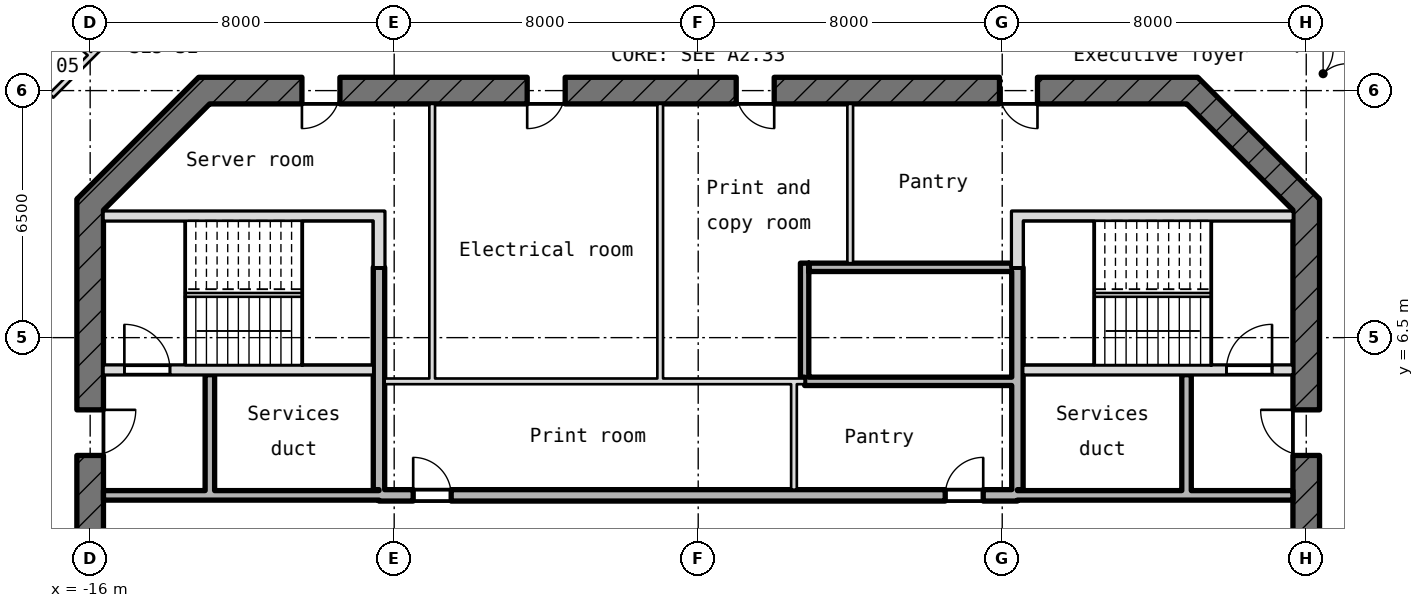
"""IFC4 building model, lengths in metres.
Left out: names, types, materials, properties, quantities, classifications, styles, units other than length and angle.
Written with IfcOpenShell. Run it as: python <this file> out.ifc"""

import sys

from ifc_helpers import new_model, si_unit, direction, frame, frame_2d, origin, place, context, subcontext, project, spatial, rectangle, extrude, element, fill, save


model = new_model("IFC4")
c1 = context("Model", 3, precision=1e-05, world=origin(), true_north=direction((0.0, 1.0)))
c2 = subcontext(c1, "Body", "Model", "MODEL_VIEW")
j1 = project(units=[si_unit("LENGTHUNIT", "METRE"), si_unit("PLANEANGLEUNIT", "RADIAN")], contexts=[c1])
p1 = place(None, origin())
s1 = spatial("IfcSite", under=j1, at=p1, CompositionType="ELEMENT")
p2 = place(p1, origin())
s2 = spatial("IfcBuilding", under=s1, at=p2, CompositionType="ELEMENT")
p3 = place(p2, frame((0.0, 0.0, 359.2)))
s3 = spatial("IfcBuildingStorey", under=s2, at=p3, CompositionType="ELEMENT", Elevation=359.2)
p4 = place(p3, frame((16.0, -10.145, -0.18), z_axis=(0.0, 0.0, 1.0), x_axis=(0.0, 1.0, 0.0)))
e1 = element("IfcWall", 1, at=p4, inside=s3, PredefinedType="SHEAR", context=c2, shape_type="SweptSolid", body=[
    extrude(rectangle(XDim=20.29, YDim=0.7, at=frame_2d((10.145, 0.0))), origin(), (0.0, 0.0, 1.0), 4.15),
])
p5 = place(p4, frame((8.945, 0.0, 0.18)))
e2 = element("IfcOpeningElement", 2, at=p5, cuts=e1, PredefinedType="OPENING", context=c2, shape_type="SweptSolid", body=[
    extrude(rectangle(XDim=2.4, YDim=2.1, at=frame_2d((1.2, 1.05))), frame((0.0, 0.36, 0.0), z_axis=(0.0, -1.0, 0.0), x_axis=(1.0, 0.0, 0.0)), (0.0, 0.0, 1.0), 0.72),
])
p6 = place(p4, frame((13.545, 0.0, 0.18)))
e3 = element("IfcOpeningElement", 3, at=p6, cuts=e1, PredefinedType="OPENING", context=c2, shape_type="SweptSolid", body=[
    extrude(rectangle(XDim=1.2, YDim=2.1, at=frame_2d((0.6, 1.05))), frame((0.0, 0.36, 0.0), z_axis=(0.0, -1.0, 0.0), x_axis=(1.0, 0.0, 0.0)), (0.0, 0.0, 1.0), 0.72),
])
p7 = place(p4, frame((2.4, 0.0, 0.18)))
e4 = element("IfcOpeningElement", 4, at=p7, cuts=e1, PredefinedType="OPENING", context=c2, shape_type="SweptSolid", body=[
    extrude(rectangle(XDim=1.2, YDim=2.1, at=frame_2d((0.6, 1.05))), frame((0.0, 0.36, 0.0), z_axis=(0.0, -1.0, 0.0), x_axis=(1.0, 0.0, 0.0)), (0.0, 0.0, 1.0), 0.72),
])
p8 = place(p3, frame((16.103, 9.897, -0.18), z_axis=(0.0, 0.0, 1.0), x_axis=(-0.707106781187, 0.707106781187, 0.0)))
e5 = element("IfcWall", 5, at=p8, inside=s3, PredefinedType="SHEAR", context=c2, shape_type="SweptSolid", body=[
    extrude(rectangle(XDim=4.533, YDim=0.7, at=frame_2d((2.266, 0.0))), origin(), (0.0, 0.0, 1.0), 4.15),
])
p9 = place(p3, frame((13.145, 13.0, -0.18), z_axis=(0.0, 0.0, 1.0), x_axis=(-1.0, 0.0, 0.0)))
e6 = element("IfcWall", 6, at=p9, inside=s3, PredefinedType="SHEAR", context=c2, shape_type="SweptSolid", body=[
    extrude(rectangle(XDim=26.29, YDim=0.7, at=frame_2d((13.145, 0.0))), origin(), (0.0, 0.0, 1.0), 4.15),
])
p10 = place(p9, frame((22.573, 0.0, 0.18)))
e7 = element("IfcOpeningElement", 7, at=p10, cuts=e6, PredefinedType="OPENING", context=c2, shape_type="SweptSolid", body=[
    extrude(rectangle(XDim=1.0, YDim=2.1, at=frame_2d((0.5, 1.05))), frame((0.0, 0.36, 0.0), z_axis=(0.0, -1.0, 0.0), x_axis=(1.0, 0.0, 0.0)), (0.0, 0.0, 1.0), 0.72),
])
p11 = place(p9, frame((16.645, 0.0, 0.18)))
e8 = element("IfcOpeningElement", 8, at=p11, cuts=e6, PredefinedType="OPENING", context=c2, shape_type="SweptSolid", body=[
    extrude(rectangle(XDim=1.0, YDim=2.1, at=frame_2d((0.5, 1.05))), frame((0.0, 0.36, 0.0), z_axis=(0.0, -1.0, 0.0), x_axis=(1.0, 0.0, 0.0)), (0.0, 0.0, 1.0), 0.72),
])
p12 = place(p9, frame((11.145, 0.0, 0.18)))
e9 = element("IfcOpeningElement", 9, at=p12, cuts=e6, PredefinedType="OPENING", context=c2, shape_type="SweptSolid", body=[
    extrude(rectangle(XDim=1.0, YDim=2.1, at=frame_2d((0.5, 1.05))), frame((0.0, 0.36, 0.0), z_axis=(0.0, -1.0, 0.0), x_axis=(1.0, 0.0, 0.0)), (0.0, 0.0, 1.0), 0.72),
])
p13 = place(p9, frame((4.217, 0.0, 0.18)))
e10 = element("IfcOpeningElement", 10, at=p13, cuts=e6, PredefinedType="OPENING", context=c2, shape_type="SweptSolid", body=[
    extrude(rectangle(XDim=1.0, YDim=2.1, at=frame_2d((0.5, 1.05))), frame((0.0, 0.36, 0.0), z_axis=(0.0, -1.0, 0.0), x_axis=(1.0, 0.0, 0.0)), (0.0, 0.0, 1.0), 0.72),
])
p14 = place(p3, frame((-12.897, 13.103, -0.18), z_axis=(0.0, 0.0, 1.0), x_axis=(-0.707106781187, -0.707106781187, 0.0)))
e11 = element("IfcWall", 11, at=p14, inside=s3, PredefinedType="SHEAR", context=c2, shape_type="SweptSolid", body=[
    extrude(rectangle(XDim=4.533, YDim=0.7, at=frame_2d((2.266, 0.0))), origin(), (0.0, 0.0, 1.0), 4.15),
])
p15 = place(p3, frame((-16.0, 10.145, -0.18), z_axis=(0.0, 0.0, 1.0), x_axis=(0.0, -1.0, 0.0)))
e12 = element("IfcWall", 12, at=p15, inside=s3, PredefinedType="SHEAR", context=c2, shape_type="SweptSolid", body=[
    extrude(rectangle(XDim=20.29, YDim=0.7, at=frame_2d((10.145, 0.0))), origin(), (0.0, 0.0, 1.0), 4.15),
])
p16 = place(p15, frame((8.945, 0.0, 0.18)))
e13 = element("IfcOpeningElement", 13, at=p16, cuts=e12, PredefinedType="OPENING", context=c2, shape_type="SweptSolid", body=[
    extrude(rectangle(XDim=2.4, YDim=2.1, at=frame_2d((1.2, 1.05))), frame((0.0, 0.36, 0.0), z_axis=(0.0, -1.0, 0.0), x_axis=(1.0, 0.0, 0.0)), (0.0, 0.0, 1.0), 0.72),
])
p17 = place(p15, frame((5.545, 0.0, 0.18)))
e14 = element("IfcOpeningElement", 14, at=p17, cuts=e12, PredefinedType="OPENING", context=c2, shape_type="SweptSolid", body=[
    extrude(rectangle(XDim=1.2, YDim=2.1, at=frame_2d((0.6, 1.05))), frame((0.0, 0.36, 0.0), z_axis=(0.0, -1.0, 0.0), x_axis=(1.0, 0.0, 0.0)), (0.0, 0.0, 1.0), 0.72),
])
p18 = place(p3, frame((-15.65, 2.35, 0.0), z_axis=(0.0, 0.0, 1.0), x_axis=(1.0, 0.0, 0.0)))
e15 = element("IfcWall", 15, at=p18, inside=s3, PredefinedType="STANDARD", context=c2, shape_type="SweptSolid", body=[
    extrude(rectangle(XDim=7.25, YDim=0.25, at=frame_2d((3.625, 0.0))), origin(), (0.0, 0.0, 1.0), 3.97),
])
p19 = place(p3, frame((-8.4, 2.35, -0.18), z_axis=(0.0, 0.0, 1.0), x_axis=(1.0, 0.0, 0.0)))
e16 = element("IfcWall", 16, at=p19, inside=s3, PredefinedType="SHEAR", context=c2, shape_type="SweptSolid", body=[
    extrude(rectangle(XDim=16.8, YDim=0.3, at=frame_2d((8.4, 0.0))), origin(), (0.0, 0.0, 1.0), 4.15),
])
p20 = place(p19, frame((0.9, 0.0, 0.18)))
e17 = element("IfcOpeningElement", 17, at=p20, cuts=e16, PredefinedType="OPENING", context=c2, shape_type="SweptSolid", body=[
    extrude(rectangle(XDim=1.0, YDim=2.1, at=frame_2d((0.5, 1.05))), frame((0.0, 0.16, 0.0), z_axis=(0.0, -1.0, 0.0), x_axis=(1.0, 0.0, 0.0)), (0.0, 0.0, 1.0), 0.32),
])
p21 = place(p19, frame((14.9, 0.0, 0.18)))
e18 = element("IfcOpeningElement", 18, at=p21, cuts=e16, PredefinedType="OPENING", context=c2, shape_type="SweptSolid", body=[
    extrude(rectangle(XDim=1.0, YDim=2.1, at=frame_2d((0.5, 1.05))), frame((0.0, 0.16, 0.0), z_axis=(0.0, -1.0, 0.0), x_axis=(1.0, 0.0, 0.0)), (0.0, 0.0, 1.0), 0.32),
])
p22 = place(p3, frame((8.4, 2.35, 0.0), z_axis=(0.0, 0.0, 1.0), x_axis=(1.0, 0.0, 0.0)))
e19 = element("IfcWall", 19, at=p22, inside=s3, PredefinedType="STANDARD", context=c2, shape_type="SweptSolid", body=[
    extrude(rectangle(XDim=7.25, YDim=0.25, at=frame_2d((3.625, 0.0))), origin(), (0.0, 0.0, 1.0), 3.97),
])
p23 = place(p3, frame((-8.25, 5.35, 0.0), z_axis=(0.0, 0.0, 1.0), x_axis=(1.0, 0.0, 0.0)))
e20 = element("IfcWall", 20, at=p23, inside=s3, PredefinedType="PARTITIONING", context=c2, shape_type="SweptSolid", body=[
    extrude(rectangle(XDim=11.05, YDim=0.15, at=frame_2d((5.525, 0.0))), origin(), (0.0, 0.0, 1.0), 3.97),
])
p24 = place(p3, frame((2.8, 5.35, 0.0), z_axis=(0.0, 0.0, 1.0), x_axis=(1.0, 0.0, 0.0)))
e21 = element("IfcWall", 21, at=p24, inside=s3, PredefinedType="STANDARD", context=c2, shape_type="SweptSolid", body=[
    extrude(rectangle(XDim=5.45, YDim=0.22, at=frame_2d((2.725, 0.0))), origin(), (0.0, 0.0, 1.0), 3.97),
])
p25 = place(p3, frame((-15.65, 5.65, -0.18), z_axis=(0.0, 0.0, 1.0), x_axis=(1.0, 0.0, 0.0)))
e22 = element("IfcWall", 22, at=p25, inside=s3, PredefinedType="SHEAR", context=c2, shape_type="SweptSolid", body=[
    extrude(rectangle(XDim=7.1, YDim=0.25, at=frame_2d((3.55, 0.0))), origin(), (0.0, 0.0, 1.0), 4.15),
])
p26 = place(p25, frame((0.55, 0.0, 0.18)))
e23 = element("IfcOpeningElement", 23, at=p26, cuts=e22, PredefinedType="OPENING", context=c2, shape_type="SweptSolid", body=[
    extrude(rectangle(XDim=1.2, YDim=2.1, at=frame_2d((0.6, 1.05))), frame((0.0, 0.135, 0.0), z_axis=(0.0, -1.0, 0.0), x_axis=(1.0, 0.0, 0.0)), (0.0, 0.0, 1.0), 0.27),
])
p27 = place(p3, frame((8.55, 5.65, -0.18), z_axis=(0.0, 0.0, 1.0), x_axis=(1.0, 0.0, 0.0)))
e24 = element("IfcWall", 24, at=p27, inside=s3, PredefinedType="SHEAR", context=c2, shape_type="SweptSolid", body=[
    extrude(rectangle(XDim=7.1, YDim=0.25, at=frame_2d((3.55, 0.0))), origin(), (0.0, 0.0, 1.0), 4.15),
])
p28 = place(p27, frame((5.35, 0.0, 0.18)))
e25 = element("IfcOpeningElement", 25, at=p28, cuts=e24, PredefinedType="OPENING", context=c2, shape_type="SweptSolid", body=[
    extrude(rectangle(XDim=1.2, YDim=2.1, at=frame_2d((0.6, 1.05))), frame((0.0, 0.135, 0.0), z_axis=(0.0, -1.0, 0.0), x_axis=(1.0, 0.0, 0.0)), (0.0, 0.0, 1.0), 0.27),
])
p29 = place(p3, frame((2.91, 8.35, 0.0), z_axis=(0.0, 0.0, 1.0), x_axis=(1.0, 0.0, 0.0)))
e26 = element("IfcWall", 26, at=p29, inside=s3, PredefinedType="STANDARD", context=c2, shape_type="SweptSolid", body=[
    extrude(rectangle(XDim=5.34, YDim=0.22, at=frame_2d((2.67, 0.0))), origin(), (0.0, 0.0, 1.0), 3.97),
])
for number, where, z_axis, x_axis in (
    (27, (-15.65, 9.7, -0.18), (0.0, 0.0, 1.0), (1.0, 0.0, 0.0)),
    (28, (8.55, 9.7, -0.18), (0.0, 0.0, 1.0), (1.0, 0.0, 0.0)),
):
    element("IfcWall", number, at=place(p3, frame(where, z_axis=z_axis, x_axis=x_axis)), inside=s3, PredefinedType="SHEAR", context=c2, shape_type="SweptSolid", body=[
        extrude(rectangle(XDim=7.1, YDim=0.25, at=frame_2d((3.55, 0.0))), origin(), (0.0, 0.0, 1.0), 4.15),
    ])
p30 = place(p3, frame((-12.85, 2.475, 0.0), z_axis=(0.0, 0.0, 1.0), x_axis=(0.0, 1.0, 0.0)))
e29 = element("IfcWall", 29, at=p30, inside=s3, PredefinedType="STANDARD", context=c2, shape_type="SweptSolid", body=[
    extrude(rectangle(XDim=3.05, YDim=0.25, at=frame_2d((1.525, 0.0))), origin(), (0.0, 0.0, 1.0), 3.97),
])
p31 = place(p3, frame((-8.4, 2.5, -0.18), z_axis=(0.0, 0.0, 1.0), x_axis=(0.0, 1.0, 0.0)))
e30 = element("IfcWall", 30, at=p31, inside=s3, PredefinedType="SHEAR", context=c2, shape_type="SweptSolid", body=[
    extrude(rectangle(XDim=5.85, YDim=0.3, at=frame_2d((2.925, 0.0))), origin(), (0.0, 0.0, 1.0), 4.15),
])
p32 = place(p3, frame((-8.4, 8.35, -0.18), z_axis=(0.0, 0.0, 1.0), x_axis=(0.0, 1.0, 0.0)))
e31 = element("IfcWall", 31, at=p32, inside=s3, PredefinedType="SHEAR", context=c2, shape_type="SweptSolid", body=[
    extrude(rectangle(XDim=1.475, YDim=0.3, at=frame_2d((0.737, 0.0))), origin(), (0.0, 0.0, 1.0), 4.15),
])
for number, where, z_axis, x_axis in (
    (32, (-7.0, 5.425, 0.0), (0.0, 0.0, 1.0), (0.0, 1.0, 0.0)),
    (33, (-1.0, 5.425, 0.0), (0.0, 0.0, 1.0), (0.0, 1.0, 0.0)),
):
    element("IfcWall", number, at=place(p3, frame(where, z_axis=z_axis, x_axis=x_axis)), inside=s3, PredefinedType="PARTITIONING", context=c2, shape_type="SweptSolid", body=[
        extrude(rectangle(XDim=7.225, YDim=0.15, at=frame_2d((3.612, 0.0))), origin(), (0.0, 0.0, 1.0), 3.97),
    ])
p33 = place(p3, frame((2.52, 2.5, 0.0), z_axis=(0.0, 0.0, 1.0), x_axis=(0.0, 1.0, 0.0)))
e34 = element("IfcWall", 34, at=p33, inside=s3, PredefinedType="PARTITIONING", context=c2, shape_type="SweptSolid", body=[
    extrude(rectangle(XDim=2.775, YDim=0.15, at=frame_2d((1.387, 0.0))), origin(), (0.0, 0.0, 1.0), 3.97),
])
p34 = place(p3, frame((2.8, 5.46, 0.0), z_axis=(0.0, 0.0, 1.0), x_axis=(0.0, 1.0, 0.0)))
e35 = element("IfcWall", 35, at=p34, inside=s3, PredefinedType="STANDARD", context=c2, shape_type="SweptSolid", body=[
    extrude(rectangle(XDim=3.0, YDim=0.22, at=frame_2d((1.5, 0.0))), origin(), (0.0, 0.0, 1.0), 3.97),
])
p35 = place(p3, frame((4.0, 8.46, 0.0), z_axis=(0.0, 0.0, 1.0), x_axis=(0.0, 1.0, 0.0)))
e36 = element("IfcWall", 36, at=p35, inside=s3, PredefinedType="PARTITIONING", context=c2, shape_type="SweptSolid", body=[
    extrude(rectangle(XDim=4.19, YDim=0.15, at=frame_2d((2.095, 0.0))), origin(), (0.0, 0.0, 1.0), 3.97),
])
p36 = place(p3, frame((8.4, 2.5, -0.18), z_axis=(0.0, 0.0, 1.0), x_axis=(0.0, 1.0, 0.0)))
e37 = element("IfcWall", 37, at=p36, inside=s3, PredefinedType="SHEAR", context=c2, shape_type="SweptSolid", body=[
    extrude(rectangle(XDim=5.85, YDim=0.3, at=frame_2d((2.925, 0.0))), origin(), (0.0, 0.0, 1.0), 4.15),
])
p37 = place(p3, frame((8.4, 8.35, -0.18), z_axis=(0.0, 0.0, 1.0), x_axis=(0.0, 1.0, 0.0)))
e38 = element("IfcWall", 38, at=p37, inside=s3, PredefinedType="SHEAR", context=c2, shape_type="SweptSolid", body=[
    extrude(rectangle(XDim=1.475, YDim=0.3, at=frame_2d((0.737, 0.0))), origin(), (0.0, 0.0, 1.0), 4.15),
])
p38 = place(p3, frame((12.85, 2.475, 0.0), z_axis=(0.0, 0.0, 1.0), x_axis=(0.0, 1.0, 0.0)))
e39 = element("IfcWall", 39, at=p38, inside=s3, PredefinedType="STANDARD", context=c2, shape_type="SweptSolid", body=[
    extrude(rectangle(XDim=3.05, YDim=0.25, at=frame_2d((1.525, 0.0))), origin(), (0.0, 0.0, 1.0), 3.97),
])
p39 = place(p3, frame((-18.75, 11.139, 0.0), z_axis=(0.0, 0.0, 1.0), x_axis=(0.707106781187, 0.707106781187, 0.0)))
e40 = element("IfcWall", 40, at=p39, inside=s3, PredefinedType="PARTITIONING", context=c2, shape_type="SweptSolid", body=[
    extrude(rectangle(XDim=6.521, YDim=0.15, at=frame_2d((3.26, 0.0))), origin(), (0.0, 0.0, 1.0), 3.97),
])
p40 = place(p39, frame((1.494, 0.0, 0.0)))
e41 = element("IfcOpeningElement", 41, at=p40, cuts=e40, PredefinedType="OPENING", context=c2, shape_type="SweptSolid", body=[
    extrude(rectangle(XDim=0.95, YDim=2.1, at=frame_2d((0.475, 1.05))), frame((0.0, 0.085, 0.0), z_axis=(0.0, -1.0, 0.0), x_axis=(1.0, 0.0, 0.0)), (0.0, 0.0, 1.0), 0.17),
])
p41 = place(p3, frame((-15.966, 13.924, 0.0), z_axis=(0.0, 0.0, 1.0), x_axis=(-0.753716775668, 0.657199377721, 0.0)))
e42 = element("IfcWall", 42, at=p41, inside=s3, PredefinedType="PARTITIONING", context=c2, shape_type="SweptSolid", body=[
    extrude(rectangle(XDim=1.829, YDim=0.12, at=frame_2d((0.915, 0.0))), origin(), (0.0, 0.0, 1.0), 3.668),
])
p42 = place(p3, frame((14.139, 15.75, 0.0), z_axis=(0.0, 0.0, 1.0), x_axis=(0.707106781187, -0.707106781187, 0.0)))
e43 = element("IfcWall", 43, at=p42, inside=s3, PredefinedType="PARTITIONING", context=c2, shape_type="SweptSolid", body=[
    extrude(rectangle(XDim=6.521, YDim=0.15, at=frame_2d((3.26, 0.0))), origin(), (0.0, 0.0, 1.0), 3.97),
])
p43 = place(p42, frame((2.36, 0.0, 0.0)))
e44 = element("IfcOpeningElement", 44, at=p43, cuts=e43, PredefinedType="OPENING", context=c2, shape_type="SweptSolid", body=[
    extrude(rectangle(XDim=1.8, YDim=2.1, at=frame_2d((0.9, 1.05))), frame((0.0, 0.085, 0.0), z_axis=(0.0, -1.0, 0.0), x_axis=(1.0, 0.0, 0.0)), (0.0, 0.0, 1.0), 0.17),
])
p44 = place(p26, origin())
e45 = element("IfcDoor", 45, at=p44, inside=s3, OperationType="SINGLE_SWING_RIGHT", PredefinedType="DOOR", context=c2, shape_type="SweptSolid", body=[
    extrude(rectangle(XDim=1.2, YDim=2.1, at=frame_2d((0.6, 1.05))), frame((0.0, 0.025, 0.0), z_axis=(0.0, -1.0, 0.0), x_axis=(1.0, 0.0, 0.0)), (0.0, 0.0, 1.0), 0.05),
])
fill(e23, e45)
p45 = place(p28, origin())
e46 = element("IfcDoor", 46, at=p45, inside=s3, OperationType="SINGLE_SWING_RIGHT", PredefinedType="DOOR", context=c2, shape_type="SweptSolid", body=[
    extrude(rectangle(XDim=1.2, YDim=2.1, at=frame_2d((0.6, 1.05))), frame((0.0, 0.025, 0.0), z_axis=(0.0, -1.0, 0.0), x_axis=(1.0, 0.0, 0.0)), (0.0, 0.0, 1.0), 0.05),
])
fill(e25, e46)
p46 = place(p17, origin())
e47 = element("IfcDoor", 47, at=p46, inside=s3, OperationType="SINGLE_SWING_RIGHT", PredefinedType="DOOR", context=c2, shape_type="SweptSolid", body=[
    extrude(rectangle(XDim=1.2, YDim=2.1, at=frame_2d((0.6, 1.05))), frame((0.0, 0.025, 0.0), z_axis=(0.0, -1.0, 0.0), x_axis=(1.0, 0.0, 0.0)), (0.0, 0.0, 1.0), 0.05),
])
fill(e14, e47)
p47 = place(p6, origin())
e48 = element("IfcDoor", 48, at=p47, inside=s3, OperationType="SINGLE_SWING_RIGHT", PredefinedType="DOOR", context=c2, shape_type="SweptSolid", body=[
    extrude(rectangle(XDim=1.2, YDim=2.1, at=frame_2d((0.6, 1.05))), frame((0.0, 0.025, 0.0), z_axis=(0.0, -1.0, 0.0), x_axis=(1.0, 0.0, 0.0)), (0.0, 0.0, 1.0), 0.05),
])
fill(e3, e48)
p48 = place(p20, origin())
e49 = element("IfcDoor", 49, at=p48, inside=s3, OperationType="SINGLE_SWING_RIGHT", PredefinedType="DOOR", context=c2, shape_type="SweptSolid", body=[
    extrude(rectangle(XDim=1.0, YDim=2.1, at=frame_2d((0.5, 1.05))), frame((0.0, 0.025, 0.0), z_axis=(0.0, -1.0, 0.0), x_axis=(1.0, 0.0, 0.0)), (0.0, 0.0, 1.0), 0.05),
])
fill(e17, e49)
p49 = place(p21, origin())
e50 = element("IfcDoor", 50, at=p49, inside=s3, OperationType="SINGLE_SWING_RIGHT", PredefinedType="DOOR", context=c2, shape_type="SweptSolid", body=[
    extrude(rectangle(XDim=1.0, YDim=2.1, at=frame_2d((0.5, 1.05))), frame((0.0, 0.025, 0.0), z_axis=(0.0, -1.0, 0.0), x_axis=(1.0, 0.0, 0.0)), (0.0, 0.0, 1.0), 0.05),
])
fill(e18, e50)
p50 = place(p10, origin())
e51 = element("IfcDoor", 51, at=p50, inside=s3, OperationType="SINGLE_SWING_RIGHT", PredefinedType="DOOR", context=c2, shape_type="SweptSolid", body=[
    extrude(rectangle(XDim=1.0, YDim=2.1, at=frame_2d((0.5, 1.05))), frame((0.0, 0.025, 0.0), z_axis=(0.0, -1.0, 0.0), x_axis=(1.0, 0.0, 0.0)), (0.0, 0.0, 1.0), 0.05),
])
fill(e7, e51)
p51 = place(p11, origin())
e52 = element("IfcDoor", 52, at=p51, inside=s3, OperationType="SINGLE_SWING_RIGHT", PredefinedType="DOOR", context=c2, shape_type="SweptSolid", body=[
    extrude(rectangle(XDim=1.0, YDim=2.1, at=frame_2d((0.5, 1.05))), frame((0.0, 0.025, 0.0), z_axis=(0.0, -1.0, 0.0), x_axis=(1.0, 0.0, 0.0)), (0.0, 0.0, 1.0), 0.05),
])
fill(e8, e52)
p52 = place(p12, origin())
e53 = element("IfcDoor", 53, at=p52, inside=s3, OperationType="SINGLE_SWING_RIGHT", PredefinedType="DOOR", context=c2, shape_type="SweptSolid", body=[
    extrude(rectangle(XDim=1.0, YDim=2.1, at=frame_2d((0.5, 1.05))), frame((0.0, 0.025, 0.0), z_axis=(0.0, -1.0, 0.0), x_axis=(1.0, 0.0, 0.0)), (0.0, 0.0, 1.0), 0.05),
])
fill(e9, e53)
p53 = place(p13, origin())
e54 = element("IfcDoor", 54, at=p53, inside=s3, OperationType="SINGLE_SWING_RIGHT", PredefinedType="DOOR", context=c2, shape_type="SweptSolid", body=[
    extrude(rectangle(XDim=1.0, YDim=2.1, at=frame_2d((0.5, 1.05))), frame((0.0, 0.025, 0.0), z_axis=(0.0, -1.0, 0.0), x_axis=(1.0, 0.0, 0.0)), (0.0, 0.0, 1.0), 0.05),
])
fill(e10, e54)
p54 = place(p43, origin())
e55 = element("IfcDoor", 55, at=p54, inside=s3, OperationType="DOUBLE_DOOR_SINGLE_SWING", PredefinedType="DOOR", context=c2, shape_type="SweptSolid", body=[
    extrude(rectangle(XDim=1.8, YDim=2.1, at=frame_2d((0.9, 1.05))), frame((0.0, 0.025, 0.0), z_axis=(0.0, -1.0, 0.0), x_axis=(1.0, 0.0, 0.0)), (0.0, 0.0, 1.0), 0.05),
])
fill(e44, e55)
save(model, sys.argv[1])
